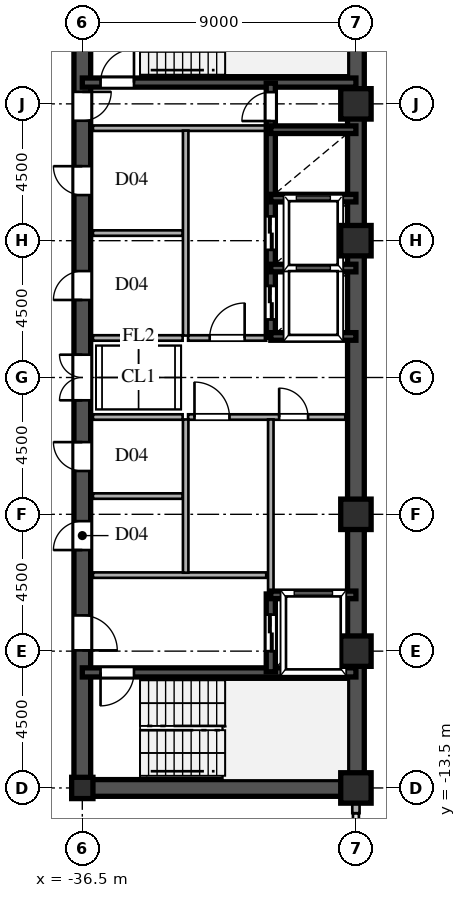
"""IFC4 building model, lengths in metres.
Left out: names, types, materials, properties, quantities, classifications, styles, units other than length and angle.
Written with IfcOpenShell. Run it as: python <this file> out.ifc"""

import sys

from ifc_helpers import new_model, si_unit, direction, frame, frame_2d, origin, origin_2d, place, context, subcontext, project, spatial, rectangle, hollow_rectangle, i_section, extrude, source, transform, mapped, element, fill, save


model = new_model("IFC4")
c1 = context("Model", 3, precision=1e-05, world=origin(), true_north=direction((0.0, 1.0)))
c2 = subcontext(c1, "Body", "Model", "MODEL_VIEW")
j1 = project(units=[si_unit("LENGTHUNIT", "METRE"), si_unit("PLANEANGLEUNIT", "RADIAN")], contexts=[c1])
p1 = place(None, origin())
s1 = spatial("IfcSite", under=j1, at=p1, CompositionType="ELEMENT")
p2 = place(p1, origin())
s2 = spatial("IfcBuilding", under=s1, at=p2, CompositionType="ELEMENT")
p3 = place(p2, frame((0.0, 0.0, 147.6)))
s3 = spatial("IfcBuildingStorey", under=s2, at=p3, CompositionType="ELEMENT", Elevation=147.6)
m1 = source(origin(), c2, "Body", "SweptSolid", [
    extrude(hollow_rectangle(XDim=1.0, YDim=1.0, WallThickness=0.042, at=origin_2d()), origin(), (0.0, 0.0, 1.0), 3.6),
])
for number, where, z_axis, x_axis in (
    (1, (-27.5, -13.5, 0.0), (0.0, 0.0, 1.0), (1.0, 0.0, 0.0)),
    (2, (-27.5, -9.0, 0.0), (0.0, 0.0, 1.0), (1.0, 0.0, 0.0)),
    (3, (-27.5, -4.5, 0.0), (0.0, 0.0, 1.0), (1.0, 0.0, 0.0)),
    (4, (-27.5, 4.5, 0.0), (0.0, 0.0, 1.0), (1.0, 0.0, 0.0)),
    (5, (-27.5, 9.0, 0.0), (0.0, 0.0, 1.0), (1.0, 0.0, 0.0)),
):
    element("IfcColumn", number, at=place(p3, frame(where, z_axis=z_axis, x_axis=x_axis)), inside=s3, PredefinedType="COLUMN", context=c2, shape_type="MappedRepresentation", body=[
        mapped(m1, transform((0.0, 0.0, 0.0), scale=1.0)),
    ])
m2 = source(origin(), c2, "Body", "SweptSolid", [
    extrude(i_section(OverallWidth=0.7, OverallDepth=0.7, WebThickness=0.028, FlangeThickness=0.045, at=origin_2d()), origin(), (0.0, 0.0, 1.0), 3.6),
])
p4 = place(p3, frame((-36.5, -13.5, 0.0), z_axis=(0.0, 0.0, 1.0), x_axis=(1.0, 0.0, 0.0)))
e6 = element("IfcColumn", 6, at=p4, inside=s3, PredefinedType="COLUMN", context=c2, shape_type="MappedRepresentation", body=[
    mapped(m2, transform((0.0, 0.0, 0.0), scale=1.0)),
])
p5 = place(p3, frame((-27.5, -14.33, 0.0), z_axis=(0.0, 0.0, 1.0), x_axis=(0.0, 1.0, 0.0)))
e7 = element("IfcWall", 7, at=p5, inside=s3, PredefinedType="SOLIDWALL", context=c2, shape_type="SweptSolid", body=[
    extrude(rectangle(XDim=0.55, YDim=0.24, at=frame_2d((0.275, 0.0))), origin(), (0.0, 0.0, 1.0), 2.88),
])
for number, where, z_axis, x_axis in (
    (8, (-27.5, -13.5, 0.0), (0.0, 0.0, 1.0), (0.0, 1.0, 0.0)),
    (9, (-27.5, 1.3, 0.0), (0.0, 0.0, 1.0), (0.0, 1.0, 0.0)),
):
    element("IfcWall", number, at=place(p3, frame(where, z_axis=z_axis, x_axis=x_axis)), inside=s3, PredefinedType="SHEAR", context=c2, shape_type="SweptSolid", body=[
        extrude(rectangle(XDim=12.2, YDim=0.55, at=frame_2d((6.1, 0.0))), origin(), (0.0, 0.0, 1.0), 3.38),
    ])
p6 = place(p3, frame((-27.5, -1.3, 0.0), z_axis=(0.0, 0.0, 1.0), x_axis=(0.0, 1.0, 0.0)))
e10 = element("IfcWall", 10, at=p6, inside=s3, PredefinedType="SHEAR", context=c2, shape_type="SweptSolid", body=[
    extrude(rectangle(XDim=2.6, YDim=0.55, at=frame_2d((1.3, 0.0))), origin(), (0.0, 0.0, 1.0), 3.38),
])
p7 = place(p3, frame((-36.5, -13.5, 0.0), z_axis=(0.0, 0.0, 1.0), x_axis=(1.0, 0.0, 0.0)))
e11 = element("IfcWall", 11, at=p7, inside=s3, PredefinedType="SHEAR", context=c2, shape_type="SweptSolid", body=[
    extrude(rectangle(XDim=9.0, YDim=0.55, at=frame_2d((4.5, 0.0))), origin(), (0.0, 0.0, 1.0), 3.38),
])
p8 = place(p3, frame((-36.5, -13.65, 0.0), z_axis=(0.0, 0.0, 1.0), x_axis=(0.0, 1.0, 0.0)))
e12 = element("IfcWall", 12, at=p8, inside=s3, PredefinedType="SHEAR", context=c2, shape_type="SweptSolid", body=[
    extrude(rectangle(XDim=7.15, YDim=0.55, at=frame_2d((3.575, 0.0))), origin(), (0.0, 0.0, 1.0), 3.38),
])
p9 = place(p8, frame((4.675, 0.0, 0.0)))
e13 = element("IfcOpeningElement", 13, at=p9, cuts=e12, PredefinedType="OPENING", context=c2, shape_type="SweptSolid", body=[
    extrude(rectangle(XDim=1.15, YDim=2.2, at=frame_2d((0.575, 1.1))), frame((0.0, 0.285, 0.0), z_axis=(0.0, -1.0, 0.0), x_axis=(1.0, 0.0, 0.0)), (0.0, 0.0, 1.0), 0.57),
])
p10 = place(p3, frame((-36.5, -1.3, 0.0), z_axis=(0.0, 0.0, 1.0), x_axis=(0.0, 1.0, 0.0)))
e14 = element("IfcWall", 14, at=p10, inside=s3, PredefinedType="SHEAR", context=c2, shape_type="SweptSolid", body=[
    extrude(rectangle(XDim=2.6, YDim=0.55, at=frame_2d((1.3, 0.0))), origin(), (0.0, 0.0, 1.0), 3.38),
])
p11 = place(p10, frame((0.55, 0.0, 0.0)))
e15 = element("IfcOpeningElement", 15, at=p11, cuts=e14, PredefinedType="OPENING", context=c2, shape_type="SweptSolid", body=[
    extrude(rectangle(XDim=1.5, YDim=2.3, at=frame_2d((0.75, 1.15))), frame((0.0, 0.285, 0.0), z_axis=(0.0, -1.0, 0.0), x_axis=(1.0, 0.0, 0.0)), (0.0, 0.0, 1.0), 0.57),
])
p12 = place(p3, frame((-36.5, 8.2, 0.0), z_axis=(0.0, 0.0, 1.0), x_axis=(0.0, 1.0, 0.0)))
e16 = element("IfcWall", 16, at=p12, inside=s3, PredefinedType="SHEAR", context=c2, shape_type="SweptSolid", body=[
    extrude(rectangle(XDim=5.45, YDim=0.55, at=frame_2d((2.725, 0.0))), origin(), (0.0, 0.0, 1.0), 3.38),
])
p13 = place(p12, frame((0.245, 0.0, 0.0)))
e17 = element("IfcOpeningElement", 17, at=p13, cuts=e16, PredefinedType="OPENING", context=c2, shape_type="SweptSolid", body=[
    extrude(rectangle(XDim=0.95, YDim=2.15, at=frame_2d((0.475, 1.075))), frame((0.0, 0.285, 0.0), z_axis=(0.0, -1.0, 0.0), x_axis=(1.0, 0.0, 0.0)), (0.0, 0.0, 1.0), 0.57),
])
p14 = place(p3, frame((-36.5, -6.5, 0.0), z_axis=(0.0, 0.0, 1.0), x_axis=(0.0, 1.0, 0.0)))
e18 = element("IfcWall", 18, at=p14, inside=s3, PredefinedType="SHEAR", context=c2, shape_type="SweptSolid", body=[
    extrude(rectangle(XDim=2.6, YDim=0.55, at=frame_2d((1.3, 0.0))), origin(), (0.0, 0.0, 1.0), 3.38),
])
p15 = place(p14, frame((0.825, 0.0, 0.0)))
e19 = element("IfcOpeningElement", 19, at=p15, cuts=e18, PredefinedType="OPENING", context=c2, shape_type="SweptSolid", body=[
    extrude(rectangle(XDim=0.95, YDim=2.15, at=frame_2d((0.475, 1.075))), frame((0.0, 0.285, 0.0), z_axis=(0.0, -1.0, 0.0), x_axis=(1.0, 0.0, 0.0)), (0.0, 0.0, 1.0), 0.57),
])
p16 = place(p3, frame((-36.5, -3.9, 0.0), z_axis=(0.0, 0.0, 1.0), x_axis=(0.0, 1.0, 0.0)))
e20 = element("IfcWall", 20, at=p16, inside=s3, PredefinedType="SHEAR", context=c2, shape_type="SweptSolid", body=[
    extrude(rectangle(XDim=2.6, YDim=0.55, at=frame_2d((1.3, 0.0))), origin(), (0.0, 0.0, 1.0), 3.38),
])
p17 = place(p16, frame((0.825, 0.0, 0.0)))
e21 = element("IfcOpeningElement", 21, at=p17, cuts=e20, PredefinedType="OPENING", context=c2, shape_type="SweptSolid", body=[
    extrude(rectangle(XDim=0.95, YDim=2.15, at=frame_2d((0.475, 1.075))), frame((0.0, 0.285, 0.0), z_axis=(0.0, -1.0, 0.0), x_axis=(1.0, 0.0, 0.0)), (0.0, 0.0, 1.0), 0.57),
])
p18 = place(p3, frame((-36.5, 1.3, 0.0), z_axis=(0.0, 0.0, 1.0), x_axis=(0.0, 1.0, 0.0)))
e22 = element("IfcWall", 22, at=p18, inside=s3, PredefinedType="SHEAR", context=c2, shape_type="SweptSolid", body=[
    extrude(rectangle(XDim=3.45, YDim=0.55, at=frame_2d((1.725, 0.0))), origin(), (0.0, 0.0, 1.0), 3.38),
])
p19 = place(p18, frame((1.25, 0.0, 0.0)))
e23 = element("IfcOpeningElement", 23, at=p19, cuts=e22, PredefinedType="OPENING", context=c2, shape_type="SweptSolid", body=[
    extrude(rectangle(XDim=0.95, YDim=2.15, at=frame_2d((0.475, 1.075))), frame((0.0, 0.285, 0.0), z_axis=(0.0, -1.0, 0.0), x_axis=(1.0, 0.0, 0.0)), (0.0, 0.0, 1.0), 0.57),
])
p20 = place(p3, frame((-36.5, 4.75, 0.0), z_axis=(0.0, 0.0, 1.0), x_axis=(0.0, 1.0, 0.0)))
e24 = element("IfcWall", 24, at=p20, inside=s3, PredefinedType="SHEAR", context=c2, shape_type="SweptSolid", body=[
    extrude(rectangle(XDim=3.45, YDim=0.55, at=frame_2d((1.725, 0.0))), origin(), (0.0, 0.0, 1.0), 3.38),
])
p21 = place(p20, frame((1.25, 0.0, 0.0)))
e25 = element("IfcOpeningElement", 25, at=p21, cuts=e24, PredefinedType="OPENING", context=c2, shape_type="SweptSolid", body=[
    extrude(rectangle(XDim=0.95, YDim=2.15, at=frame_2d((0.475, 1.075))), frame((0.0, 0.285, 0.0), z_axis=(0.0, -1.0, 0.0), x_axis=(1.0, 0.0, 0.0)), (0.0, 0.0, 1.0), 0.57),
])
p22 = place(p3, frame((-36.5, -9.7, 0.0), z_axis=(0.0, 0.0, 1.0), x_axis=(1.0, 0.0, 0.0)))
e26 = element("IfcWall", 26, at=p22, inside=s3, PredefinedType="SHEAR", context=c2, shape_type="SweptSolid", body=[
    extrude(rectangle(XDim=9.0, YDim=0.3, at=frame_2d((4.5, 0.0))), origin(), (0.0, 0.0, 1.0), 3.38),
])
p23 = place(p22, frame((0.6, 0.0, 0.0)))
e27 = element("IfcOpeningElement", 27, at=p23, cuts=e26, PredefinedType="OPENING", context=c2, shape_type="SweptSolid", body=[
    extrude(rectangle(XDim=1.1, YDim=2.2, at=frame_2d((0.55, 1.1))), frame((0.0, 0.16, 0.0), z_axis=(0.0, -1.0, 0.0), x_axis=(1.0, 0.0, 0.0)), (0.0, 0.0, 1.0), 0.32),
])
p24 = place(p3, frame((-36.5, 9.7, 0.0), z_axis=(0.0, 0.0, 1.0), x_axis=(1.0, 0.0, 0.0)))
e28 = element("IfcWall", 28, at=p24, inside=s3, PredefinedType="SHEAR", context=c2, shape_type="SweptSolid", body=[
    extrude(rectangle(XDim=9.0, YDim=0.3, at=frame_2d((4.5, 0.0))), origin(), (0.0, 0.0, 1.0), 3.38),
])
p25 = place(p24, frame((0.6, 0.0, 0.0)))
e29 = element("IfcOpeningElement", 29, at=p25, cuts=e28, PredefinedType="OPENING", context=c2, shape_type="SweptSolid", body=[
    extrude(rectangle(XDim=1.1, YDim=2.2, at=frame_2d((0.55, 1.1))), frame((0.0, 0.16, 0.0), z_axis=(0.0, -1.0, 0.0), x_axis=(1.0, 0.0, 0.0)), (0.0, 0.0, 1.0), 0.32),
])
for number, where, z_axis, x_axis in (
    (30, (-30.3, -7.15, 0.0), (0.0, 0.0, 1.0), (1.0, 0.0, 0.0)),
    (31, (-30.3, 1.35, 0.0), (0.0, 0.0, 1.0), (1.0, 0.0, 0.0)),
    (32, (-30.3, 3.6, 0.0), (0.0, 0.0, 1.0), (1.0, 0.0, 0.0)),
    (33, (-30.3, 5.9, 0.0), (0.0, 0.0, 1.0), (1.0, 0.0, 0.0)),
    (34, (-30.3, 8.15, 0.0), (0.0, 0.0, 1.0), (1.0, 0.0, 0.0)),
):
    element("IfcWall", number, at=place(p3, frame(where, z_axis=z_axis, x_axis=x_axis)), inside=s3, PredefinedType="SHEAR", context=c2, shape_type="SweptSolid", body=[
        extrude(rectangle(XDim=2.8, YDim=0.25, at=frame_2d((1.4, 0.0))), origin(), (0.0, 0.0, 1.0), 3.38),
    ])
p26 = place(p3, frame((-30.3, -9.68, 0.0), z_axis=(0.0, 0.0, 1.0), x_axis=(0.0, 1.0, 0.0)))
e35 = element("IfcWall", 35, at=p26, inside=s3, PredefinedType="SHEAR", context=c2, shape_type="SweptSolid", body=[
    extrude(rectangle(XDim=2.56, YDim=0.3, at=frame_2d((1.28, 0.0))), origin(), (0.0, 0.0, 1.0), 3.38),
])
p27 = place(p26, frame((0.68, 0.0, 0.0)))
e36 = element("IfcOpeningElement", 36, at=p27, cuts=e35, PredefinedType="OPENING", context=c2, shape_type="SweptSolid", body=[
    extrude(rectangle(XDim=1.2, YDim=2.25, at=frame_2d((0.6, 1.125))), frame((0.0, 0.16, 0.0), z_axis=(0.0, -1.0, 0.0), x_axis=(1.0, 0.0, 0.0)), (0.0, 0.0, 1.0), 0.32),
])
p28 = place(p3, frame((-30.3, 1.32, 0.0), z_axis=(0.0, 0.0, 1.0), x_axis=(0.0, 1.0, 0.0)))
e37 = element("IfcWall", 37, at=p28, inside=s3, PredefinedType="SHEAR", context=c2, shape_type="SweptSolid", body=[
    extrude(rectangle(XDim=2.28, YDim=0.3, at=frame_2d((1.14, 0.0))), origin(), (0.0, 0.0, 1.0), 3.38),
])
p29 = place(p28, frame((0.59, 0.0, 0.0)))
e38 = element("IfcOpeningElement", 38, at=p29, cuts=e37, PredefinedType="OPENING", context=c2, shape_type="SweptSolid", body=[
    extrude(rectangle(XDim=1.1, YDim=2.2, at=frame_2d((0.55, 1.1))), frame((0.0, 0.16, 0.0), z_axis=(0.0, -1.0, 0.0), x_axis=(1.0, 0.0, 0.0)), (0.0, 0.0, 1.0), 0.32),
])
p30 = place(p3, frame((-30.3, 3.6, 0.0), z_axis=(0.0, 0.0, 1.0), x_axis=(0.0, 1.0, 0.0)))
e39 = element("IfcWall", 39, at=p30, inside=s3, PredefinedType="SHEAR", context=c2, shape_type="SweptSolid", body=[
    extrude(rectangle(XDim=2.3, YDim=0.3, at=frame_2d((1.15, 0.0))), origin(), (0.0, 0.0, 1.0), 3.38),
])
p31 = place(p30, frame((0.6, 0.0, 0.0)))
e40 = element("IfcOpeningElement", 40, at=p31, cuts=e39, PredefinedType="OPENING", context=c2, shape_type="SweptSolid", body=[
    extrude(rectangle(XDim=1.1, YDim=2.2, at=frame_2d((0.55, 1.1))), frame((0.0, 0.16, 0.0), z_axis=(0.0, -1.0, 0.0), x_axis=(1.0, 0.0, 0.0)), (0.0, 0.0, 1.0), 0.32),
])
p32 = place(p3, frame((-30.3, 5.9, 0.0), z_axis=(0.0, 0.0, 1.0), x_axis=(0.0, 1.0, 0.0)))
e41 = element("IfcWall", 41, at=p32, inside=s3, PredefinedType="SHEAR", context=c2, shape_type="SweptSolid", body=[
    extrude(rectangle(XDim=2.25, YDim=0.3, at=frame_2d((1.125, 0.0))), origin(), (0.0, 0.0, 1.0), 3.38),
])
p33 = place(p3, frame((-30.3, 8.15, 0.0), z_axis=(0.0, 0.0, 1.0), x_axis=(0.0, 1.0, 0.0)))
e42 = element("IfcWall", 42, at=p33, inside=s3, PredefinedType="SHEAR", context=c2, shape_type="SweptSolid", body=[
    extrude(rectangle(XDim=1.53, YDim=0.3, at=frame_2d((0.765, 0.0))), origin(), (0.0, 0.0, 1.0), 3.38),
])
p34 = place(p33, frame((0.285, 0.0, 0.0)))
e43 = element("IfcOpeningElement", 43, at=p34, cuts=e42, PredefinedType="OPENING", context=c2, shape_type="SweptSolid", body=[
    extrude(rectangle(XDim=0.95, YDim=2.15, at=frame_2d((0.475, 1.075))), frame((0.0, 0.16, 0.0), z_axis=(0.0, -1.0, 0.0), x_axis=(1.0, 0.0, 0.0)), (0.0, 0.0, 1.0), 0.32),
])
for number, where, z_axis, x_axis in (
    (44, (-36.15, -6.5, 0.0), (0.0, 0.0, 1.0), (1.0, 0.0, 0.0)),
    (45, (-36.15, 8.2, 0.0), (0.0, 0.0, 1.0), (1.0, 0.0, 0.0)),
):
    element("IfcWall", number, at=place(p3, frame(where, z_axis=z_axis, x_axis=x_axis)), inside=s3, PredefinedType="PARTITIONING", context=c2, shape_type="SweptSolid", body=[
        extrude(rectangle(XDim=5.7, YDim=0.18, at=frame_2d((2.85, 0.0))), origin(), (0.0, 0.0, 1.0), 3.38),
    ])
p35 = place(p3, frame((-33.1, -6.42, 0.0), z_axis=(0.0, 0.0, 1.0), x_axis=(0.0, 1.0, 0.0)))
e46 = element("IfcWall", 46, at=p35, inside=s3, PredefinedType="PARTITIONING", context=c2, shape_type="SweptSolid", body=[
    extrude(rectangle(XDim=5.04, YDim=0.18, at=frame_2d((2.52, 0.0))), origin(), (0.0, 0.0, 1.0), 3.38),
])
p36 = place(p3, frame((-33.1, 1.38, 0.0), z_axis=(0.0, 0.0, 1.0), x_axis=(0.0, 1.0, 0.0)))
e47 = element("IfcWall", 47, at=p36, inside=s3, PredefinedType="PARTITIONING", context=c2, shape_type="SweptSolid", body=[
    extrude(rectangle(XDim=6.74, YDim=0.18, at=frame_2d((3.37, 0.0))), origin(), (0.0, 0.0, 1.0), 3.38),
])
p37 = place(p3, frame((-30.3, -1.3, 0.0), z_axis=(0.0, 0.0, 1.0), x_axis=(1.0, 0.0, 0.0)))
e48 = element("IfcWall", 48, at=p37, inside=s3, PredefinedType="PARTITIONING", context=c2, shape_type="SweptSolid", body=[
    extrude(rectangle(XDim=2.45, YDim=0.18, at=frame_2d((1.225, 0.0))), origin(), (0.0, 0.0, 1.0), 3.38),
])
p38 = place(p37, frame((0.275, 0.0, 0.0)))
e49 = element("IfcOpeningElement", 49, at=p38, cuts=e48, PredefinedType="OPENING", context=c2, shape_type="SweptSolid", body=[
    extrude(rectangle(XDim=0.95, YDim=2.15, at=frame_2d((0.475, 1.075))), frame((0.0, 0.1, 0.0), z_axis=(0.0, -1.0, 0.0), x_axis=(1.0, 0.0, 0.0)), (0.0, 0.0, 1.0), 0.2),
])
p39 = place(p3, frame((-33.02, -1.3, 0.0), z_axis=(0.0, 0.0, 1.0), x_axis=(1.0, 0.0, 0.0)))
e50 = element("IfcWall", 50, at=p39, inside=s3, PredefinedType="PARTITIONING", context=c2, shape_type="SweptSolid", body=[
    extrude(rectangle(XDim=2.72, YDim=0.18, at=frame_2d((1.36, 0.0))), origin(), (0.0, 0.0, 1.0), 3.38),
])
p40 = place(p39, frame((0.21, 0.0, 0.0)))
e51 = element("IfcOpeningElement", 51, at=p40, cuts=e50, PredefinedType="OPENING", context=c2, shape_type="SweptSolid", body=[
    extrude(rectangle(XDim=1.15, YDim=2.2, at=frame_2d((0.575, 1.1))), frame((0.0, 0.1, 0.0), z_axis=(0.0, -1.0, 0.0), x_axis=(1.0, 0.0, 0.0)), (0.0, 0.0, 1.0), 0.2),
])
p41 = place(p3, frame((-30.3, -7.12, 0.0), z_axis=(0.0, 0.0, 1.0), x_axis=(0.0, 1.0, 0.0)))
e52 = element("IfcWall", 52, at=p41, inside=s3, PredefinedType="PARTITIONING", context=c2, shape_type="SweptSolid", body=[
    extrude(rectangle(XDim=5.74, YDim=0.18, at=frame_2d((2.87, 0.0))), origin(), (0.0, 0.0, 1.0), 3.38),
])
p42 = place(p3, frame((-33.02, 1.3, 0.0), z_axis=(0.0, 0.0, 1.0), x_axis=(1.0, 0.0, 0.0)))
e53 = element("IfcWall", 53, at=p42, inside=s3, PredefinedType="PARTITIONING", context=c2, shape_type="SweptSolid", body=[
    extrude(rectangle(XDim=2.57, YDim=0.18, at=frame_2d((1.285, 0.0))), origin(), (0.0, 0.0, 1.0), 3.38),
])
p43 = place(p42, frame((0.71, 0.0, 0.0)))
e54 = element("IfcOpeningElement", 54, at=p43, cuts=e53, PredefinedType="OPENING", context=c2, shape_type="SweptSolid", body=[
    extrude(rectangle(XDim=1.15, YDim=2.2, at=frame_2d((0.575, 1.1))), frame((0.0, 0.1, 0.0), z_axis=(0.0, -1.0, 0.0), x_axis=(1.0, 0.0, 0.0)), (0.0, 0.0, 1.0), 0.2),
])
for number, where, z_axis, x_axis in (
    (55, (-36.15, -1.3, 0.0), (0.0, 0.0, 1.0), (1.0, 0.0, 0.0)),
    (56, (-36.15, 1.3, 0.0), (0.0, 0.0, 1.0), (1.0, 0.0, 0.0)),
    (57, (-36.15, -3.9, 0.0), (0.0, 0.0, 1.0), (1.0, 0.0, 0.0)),
    (58, (-36.15, 4.75, 0.0), (0.0, 0.0, 1.0), (1.0, 0.0, 0.0)),
):
    element("IfcWall", number, at=place(p3, frame(where, z_axis=z_axis, x_axis=x_axis)), inside=s3, PredefinedType="PARTITIONING", context=c2, shape_type="SweptSolid", body=[
        extrude(rectangle(XDim=2.95, YDim=0.18, at=frame_2d((1.475, 0.0))), origin(), (0.0, 0.0, 1.0), 3.38),
    ])
m3 = source(origin(), c2, "Body", "SweptSolid", [
    extrude(rectangle(XDim=1.15, YDim=2.2, at=frame_2d((0.575, 1.1))), frame((0.0, 0.025, 0.0), z_axis=(0.0, -1.0, 0.0), x_axis=(1.0, 0.0, 0.0)), (0.0, 0.0, 1.0), 0.05),
])
p44 = place(p9, frame((1.15, 0.0, 0.0), z_axis=(0.0, 0.0, 1.0), x_axis=(-1.0, 0.0, 0.0)))
e59 = element("IfcDoor", 59, at=p44, inside=s3, OperationType="SINGLE_SWING_LEFT", PredefinedType="DOOR", context=c2, shape_type="MappedRepresentation", body=[
    mapped(m3, transform((0.0, 0.0, 0.0), scale=1.0)),
])
fill(e13, e59)
m4 = source(origin(), c2, "Body", "SweptSolid", [
    extrude(rectangle(XDim=1.5, YDim=2.3, at=frame_2d((0.75, 1.15))), frame((0.0, 0.025, 0.0), z_axis=(0.0, -1.0, 0.0), x_axis=(1.0, 0.0, 0.0)), (0.0, 0.0, 1.0), 0.05),
])
p45 = place(p11, origin())
e60 = element("IfcDoor", 60, at=p45, inside=s3, OperationType="DOUBLE_SWING_LEFT", PredefinedType="DOOR", context=c2, shape_type="MappedRepresentation", body=[
    mapped(m4, transform((0.0, 0.0, 0.0), scale=1.0)),
])
fill(e15, e60)
m5 = source(origin(), c2, "Body", "SweptSolid", [
    extrude(rectangle(XDim=0.95, YDim=2.15, at=frame_2d((0.475, 1.075))), frame((0.0, 0.025, 0.0), z_axis=(0.0, -1.0, 0.0), x_axis=(1.0, 0.0, 0.0)), (0.0, 0.0, 1.0), 0.05),
])
p46 = place(p13, frame((0.95, 0.0, 0.0), z_axis=(0.0, 0.0, 1.0), x_axis=(-1.0, 0.0, 0.0)))
e61 = element("IfcDoor", 61, at=p46, inside=s3, OperationType="SINGLE_SWING_RIGHT", PredefinedType="DOOR", context=c2, shape_type="MappedRepresentation", body=[
    mapped(m5, transform((0.0, 0.0, 0.0), scale=1.0)),
])
fill(e17, e61)
p47 = place(p15, origin())
e62 = element("IfcDoor", 62, at=p47, inside=s3, OperationType="SINGLE_SWING_LEFT", PredefinedType="DOOR", context=c2, shape_type="MappedRepresentation", body=[
    mapped(m5, transform((0.0, 0.0, 0.0), scale=1.0)),
])
fill(e19, e62)
p48 = place(p17, origin())
e63 = element("IfcDoor", 63, at=p48, inside=s3, OperationType="SINGLE_SWING_RIGHT", PredefinedType="DOOR", context=c2, shape_type="MappedRepresentation", body=[
    mapped(m5, transform((0.0, 0.0, 0.0), scale=1.0)),
])
fill(e21, e63)
p49 = place(p19, origin())
e64 = element("IfcDoor", 64, at=p49, inside=s3, OperationType="SINGLE_SWING_LEFT", PredefinedType="DOOR", context=c2, shape_type="MappedRepresentation", body=[
    mapped(m5, transform((0.0, 0.0, 0.0), scale=1.0)),
])
fill(e23, e64)
p50 = place(p21, origin())
e65 = element("IfcDoor", 65, at=p50, inside=s3, OperationType="SINGLE_SWING_RIGHT", PredefinedType="DOOR", context=c2, shape_type="MappedRepresentation", body=[
    mapped(m5, transform((0.0, 0.0, 0.0), scale=1.0)),
])
fill(e25, e65)
m6 = source(origin(), c2, "Body", "SweptSolid", [
    extrude(rectangle(XDim=1.1, YDim=2.2, at=frame_2d((0.55, 1.1))), frame((0.0, 0.025, 0.0), z_axis=(0.0, -1.0, 0.0), x_axis=(1.0, 0.0, 0.0)), (0.0, 0.0, 1.0), 0.05),
])
p51 = place(p23, frame((1.1, 0.0, 0.0), z_axis=(0.0, 0.0, 1.0), x_axis=(-1.0, 0.0, 0.0)))
e66 = element("IfcDoor", 66, at=p51, inside=s3, OperationType="SINGLE_SWING_LEFT", PredefinedType="DOOR", context=c2, shape_type="MappedRepresentation", body=[
    mapped(m6, transform((0.0, 0.0, 0.0), scale=1.0)),
])
fill(e27, e66)
p52 = place(p25, origin())
e67 = element("IfcDoor", 67, at=p52, inside=s3, OperationType="SINGLE_SWING_RIGHT", PredefinedType="DOOR", context=c2, shape_type="MappedRepresentation", body=[
    mapped(m6, transform((0.0, 0.0, 0.0), scale=1.0)),
])
fill(e29, e67)
m7 = source(origin(), c2, "Body", "SweptSolid", [
    extrude(rectangle(XDim=1.2, YDim=2.25, at=frame_2d((0.6, 1.125))), frame((0.0, 0.025, 0.0), z_axis=(0.0, -1.0, 0.0), x_axis=(1.0, 0.0, 0.0)), (0.0, 0.0, 1.0), 0.05),
])
p53 = place(p27, origin())
e68 = element("IfcDoor", 68, at=p53, inside=s3, OperationType="DOUBLE_DOOR_SLIDING", PredefinedType="DOOR", context=c2, shape_type="MappedRepresentation", body=[
    mapped(m7, transform((0.0, 0.0, 0.0), scale=1.0)),
])
fill(e36, e68)
m8 = source(origin(), c2, "Body", "SweptSolid", [
    extrude(rectangle(XDim=1.1, YDim=2.2, at=frame_2d((0.55, 1.1))), frame((0.0, 0.025, 0.0), z_axis=(0.0, -1.0, 0.0), x_axis=(1.0, 0.0, 0.0)), (0.0, 0.0, 1.0), 0.05),
])
p54 = place(p29, origin())
e69 = element("IfcDoor", 69, at=p54, inside=s3, OperationType="DOUBLE_DOOR_SLIDING", PredefinedType="DOOR", context=c2, shape_type="MappedRepresentation", body=[
    mapped(m8, transform((0.0, 0.0, 0.0), scale=1.0)),
])
fill(e38, e69)
p55 = place(p31, origin())
e70 = element("IfcDoor", 70, at=p55, inside=s3, OperationType="DOUBLE_DOOR_SLIDING", PredefinedType="DOOR", context=c2, shape_type="MappedRepresentation", body=[
    mapped(m8, transform((0.0, 0.0, 0.0), scale=1.0)),
])
fill(e40, e70)
p56 = place(p34, origin())
e71 = element("IfcDoor", 71, at=p56, inside=s3, OperationType="SINGLE_SWING_LEFT", PredefinedType="DOOR", context=c2, shape_type="MappedRepresentation", body=[
    mapped(m5, transform((0.0, 0.0, 0.0), scale=1.0)),
])
fill(e43, e71)
p57 = place(p38, origin())
e72 = element("IfcDoor", 72, at=p57, inside=s3, OperationType="SINGLE_SWING_LEFT", PredefinedType="DOOR", context=c2, shape_type="MappedRepresentation", body=[
    mapped(m5, transform((0.0, 0.0, 0.0), scale=1.0)),
])
fill(e49, e72)
p58 = place(p40, origin())
e73 = element("IfcDoor", 73, at=p58, inside=s3, OperationType="SINGLE_SWING_LEFT", PredefinedType="DOOR", context=c2, shape_type="MappedRepresentation", body=[
    mapped(m3, transform((0.0, 0.0, 0.0), scale=1.0)),
])
fill(e51, e73)
p59 = place(p43, origin())
e74 = element("IfcDoor", 74, at=p59, inside=s3, OperationType="SINGLE_SWING_RIGHT", PredefinedType="DOOR", context=c2, shape_type="MappedRepresentation", body=[
    mapped(m3, transform((0.0, 0.0, 0.0), scale=1.0)),
])
fill(e54, e74)
save(model, sys.argv[1])
